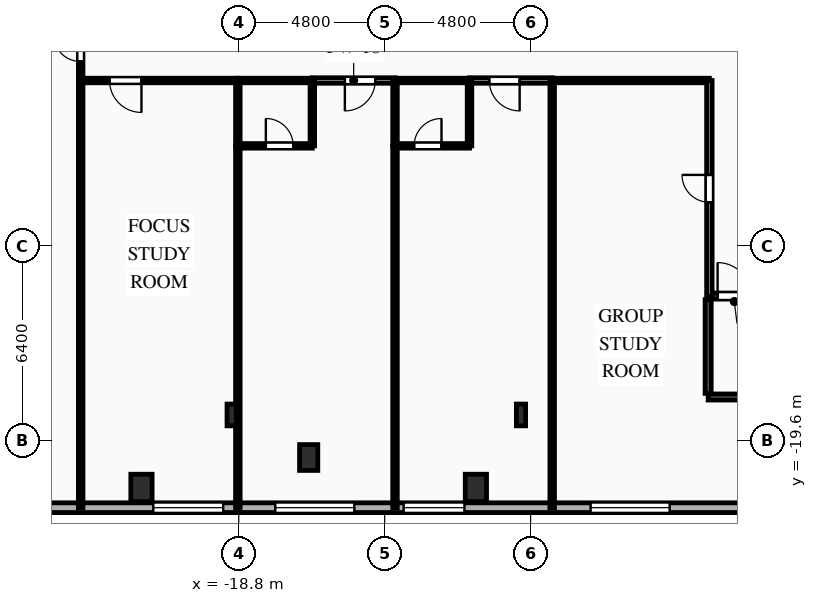
"""IFC4 building model, lengths in metres.
Left out: names, types, materials, properties, quantities, classifications, styles, units other than length and angle.
Written with IfcOpenShell. Run it as: python <this file> out.ifc"""

import sys

from ifc_helpers import new_model, si_unit, direction, frame, frame_2d, origin, origin_2d, place, context, subcontext, project, spatial, rectangle, i_section, extrude, element, fill, save


model = new_model("IFC4")
c1 = context("Model", 3, precision=1e-05, world=origin(), true_north=direction((0.0, 1.0)))
c2 = subcontext(c1, "Body", "Model", "MODEL_VIEW")
j1 = project(units=[si_unit("LENGTHUNIT", "METRE"), si_unit("PLANEANGLEUNIT", "RADIAN")], contexts=[c1])
p1 = place(None, origin())
s1 = spatial("IfcSite", under=j1, at=p1, CompositionType="ELEMENT")
p2 = place(p1, origin())
s2 = spatial("IfcBuilding", under=s1, at=p2, CompositionType="ELEMENT")
p3 = place(p2, frame((0.0, 0.0, 18.0)))
s3 = spatial("IfcBuildingStorey", under=s2, at=p3, CompositionType="ELEMENT", Elevation=18.0)
for number, where, z_axis, x_axis in (
    (1, (-22.0, -21.15, 0.0), (0.0, 0.0, 1.0), (1.0, 0.0, 0.0)),
    (2, (-11.0, -21.15, 0.0), (0.0, 0.0, 1.0), (1.0, 0.0, 0.0)),
):
    element("IfcColumn", number, at=place(p3, frame(where, z_axis=z_axis, x_axis=x_axis)), inside=s3, PredefinedType="COLUMN", context=c2, shape_type="SweptSolid", body=[
        extrude(rectangle(XDim=0.7, YDim=0.9, at=origin_2d()), origin(), (0.0, 0.0, 1.0), 4.5),
    ])
p4 = place(p3, frame((-16.5, -20.15, 0.0), z_axis=(0.0, 0.0, 1.0), x_axis=(1.0, 0.0, 0.0)))
e3 = element("IfcColumn", 3, at=p4, inside=s3, PredefinedType="PILASTER", context=c2, shape_type="SweptSolid", body=[
    extrude(rectangle(XDim=0.6, YDim=0.85, at=origin_2d()), origin(), (0.0, 0.0, 1.0), 4.5),
])
for number, where, z_axis, x_axis in (
    (4, (-19.033, -18.75, 0.0), (0.0, 0.0, 1.0), (1.0, 0.0, 0.0)),
    (5, (-9.517, -18.75, 0.0), (0.0, 0.0, 1.0), (1.0, 0.0, 0.0)),
):
    element("IfcColumn", number, at=place(p3, frame(where, z_axis=z_axis, x_axis=x_axis)), inside=s3, PredefinedType="COLUMN", context=c2, shape_type="SweptSolid", body=[
        extrude(i_section(OverallWidth=0.304, OverallDepth=0.716, WebThickness=0.021, FlangeThickness=0.04, FilletRadius=0.027, at=origin_2d()), origin(), (0.0, 0.0, 1.0), 4.5),
    ])
p5 = place(p3, frame((36.8, -21.8, 0.0), z_axis=(0.0, 0.0, 1.0), x_axis=(-1.0, 0.0, 0.0)))
e6 = element("IfcWall", 6, at=p5, inside=s3, PredefinedType="SOLIDWALL", context=c2, shape_type="SweptSolid", body=[
    extrude(rectangle(XDim=73.6, YDim=0.32, at=frame_2d((36.8, 0.0))), origin(), (0.0, 0.0, 1.0), 4.17),
])
p6 = place(p5, frame((1.079, 0.0, 0.85)))
e7 = element("IfcOpeningElement", 7, at=p6, cuts=e6, PredefinedType="OPENING", context=c2, shape_type="SweptSolid", body=[
    extrude(rectangle(XDim=2.3, YDim=2.4, at=frame_2d((1.15, 1.2))), frame((0.0, 0.17, 0.0), z_axis=(0.0, -1.0, 0.0), x_axis=(1.0, 0.0, 0.0)), (0.0, 0.0, 1.0), 0.34),
])
p7 = place(p5, frame((8.431, 0.0, 0.85)))
e8 = element("IfcOpeningElement", 8, at=p7, cuts=e6, PredefinedType="OPENING", context=c2, shape_type="SweptSolid", body=[
    extrude(rectangle(XDim=2.6, YDim=2.4, at=frame_2d((1.3, 1.2))), frame((0.0, 0.17, 0.0), z_axis=(0.0, -1.0, 0.0), x_axis=(1.0, 0.0, 0.0)), (0.0, 0.0, 1.0), 0.34),
])
p8 = place(p5, frame((13.324, 0.0, 0.85)))
e9 = element("IfcOpeningElement", 9, at=p8, cuts=e6, PredefinedType="OPENING", context=c2, shape_type="SweptSolid", body=[
    extrude(rectangle(XDim=1.1, YDim=1.85, at=frame_2d((0.55, 0.925))), frame((0.0, 0.17, 0.0), z_axis=(0.0, -1.0, 0.0), x_axis=(1.0, 0.0, 0.0)), (0.0, 0.0, 1.0), 0.34),
])
p9 = place(p5, frame((16.619, 0.0, 0.85)))
e10 = element("IfcOpeningElement", 10, at=p9, cuts=e6, PredefinedType="OPENING", context=c2, shape_type="SweptSolid", body=[
    extrude(rectangle(XDim=2.0, YDim=2.4, at=frame_2d((1.0, 1.2))), frame((0.0, 0.17, 0.0), z_axis=(0.0, -1.0, 0.0), x_axis=(1.0, 0.0, 0.0)), (0.0, 0.0, 1.0), 0.34),
])
p10 = place(p5, frame((21.125, 0.0, 0.85)))
e11 = element("IfcOpeningElement", 11, at=p10, cuts=e6, PredefinedType="OPENING", context=c2, shape_type="SweptSolid", body=[
    extrude(rectangle(XDim=2.6, YDim=2.4, at=frame_2d((1.3, 1.2))), frame((0.0, 0.17, 0.0), z_axis=(0.0, -1.0, 0.0), x_axis=(1.0, 0.0, 0.0)), (0.0, 0.0, 1.0), 0.34),
])
p11 = place(p5, frame((27.531, 0.0, 0.85)))
e12 = element("IfcOpeningElement", 12, at=p11, cuts=e6, PredefinedType="OPENING", context=c2, shape_type="SweptSolid", body=[
    extrude(rectangle(XDim=2.6, YDim=2.4, at=frame_2d((1.3, 1.2))), frame((0.0, 0.17, 0.0), z_axis=(0.0, -1.0, 0.0), x_axis=(1.0, 0.0, 0.0)), (0.0, 0.0, 1.0), 0.34),
])
p12 = place(p5, frame((33.474, 0.0, 0.85)))
e13 = element("IfcOpeningElement", 13, at=p12, cuts=e6, PredefinedType="OPENING", context=c2, shape_type="SweptSolid", body=[
    extrude(rectangle(XDim=2.6, YDim=2.4, at=frame_2d((1.3, 1.2))), frame((0.0, 0.17, 0.0), z_axis=(0.0, -1.0, 0.0), x_axis=(1.0, 0.0, 0.0)), (0.0, 0.0, 1.0), 0.34),
])
p13 = place(p5, frame((41.427, 0.0, 0.85)))
e14 = element("IfcOpeningElement", 14, at=p13, cuts=e6, PredefinedType="OPENING", context=c2, shape_type="SweptSolid", body=[
    extrude(rectangle(XDim=2.6, YDim=2.4, at=frame_2d((1.3, 1.2))), frame((0.0, 0.17, 0.0), z_axis=(0.0, -1.0, 0.0), x_axis=(1.0, 0.0, 0.0)), (0.0, 0.0, 1.0), 0.34),
])
p14 = place(p5, frame((48.177, 0.0, 0.85)))
e15 = element("IfcOpeningElement", 15, at=p14, cuts=e6, PredefinedType="OPENING", context=c2, shape_type="SweptSolid", body=[
    extrude(rectangle(XDim=2.0, YDim=2.4, at=frame_2d((1.0, 1.2))), frame((0.0, 0.17, 0.0), z_axis=(0.0, -1.0, 0.0), x_axis=(1.0, 0.0, 0.0)), (0.0, 0.0, 1.0), 0.34),
])
p15 = place(p5, frame((51.798, 0.0, 0.85)))
e16 = element("IfcOpeningElement", 16, at=p15, cuts=e6, PredefinedType="OPENING", context=c2, shape_type="SweptSolid", body=[
    extrude(rectangle(XDim=2.6, YDim=2.4, at=frame_2d((1.3, 1.2))), frame((0.0, 0.17, 0.0), z_axis=(0.0, -1.0, 0.0), x_axis=(1.0, 0.0, 0.0)), (0.0, 0.0, 1.0), 0.34),
])
p16 = place(p5, frame((56.111, 0.0, 0.85)))
e17 = element("IfcOpeningElement", 17, at=p16, cuts=e6, PredefinedType="OPENING", context=c2, shape_type="SweptSolid", body=[
    extrude(rectangle(XDim=2.3, YDim=2.4, at=frame_2d((1.15, 1.2))), frame((0.0, 0.17, 0.0), z_axis=(0.0, -1.0, 0.0), x_axis=(1.0, 0.0, 0.0)), (0.0, 0.0, 1.0), 0.34),
])
p17 = place(p5, frame((62.649, 0.0, 0.85)))
e18 = element("IfcOpeningElement", 18, at=p17, cuts=e6, PredefinedType="OPENING", context=c2, shape_type="SweptSolid", body=[
    extrude(rectangle(XDim=2.6, YDim=2.4, at=frame_2d((1.3, 1.2))), frame((0.0, 0.17, 0.0), z_axis=(0.0, -1.0, 0.0), x_axis=(1.0, 0.0, 0.0)), (0.0, 0.0, 1.0), 0.34),
])
p18 = place(p5, frame((70.301, 0.0, 0.85)))
e19 = element("IfcOpeningElement", 19, at=p18, cuts=e6, PredefinedType="OPENING", context=c2, shape_type="SweptSolid", body=[
    extrude(rectangle(XDim=2.3, YDim=2.4, at=frame_2d((1.15, 1.2))), frame((0.0, 0.17, 0.0), z_axis=(0.0, -1.0, 0.0), x_axis=(1.0, 0.0, 0.0)), (0.0, 0.0, 1.0), 0.34),
])
p19 = place(p3, frame((-3.36, -14.84, 0.0), z_axis=(0.0, 0.0, 1.0), x_axis=(1.0, 0.0, 0.0)))
e20 = element("IfcWall", 20, at=p19, inside=s3, PredefinedType="SHEAR", context=c2, shape_type="SweptSolid", body=[
    extrude(rectangle(XDim=7.22, YDim=0.2, at=frame_2d((3.61, 0.0))), origin(), (0.0, 0.0, 1.0), 4.17),
])
p20 = place(p19, frame((0.31, 0.0, 0.0)))
e21 = element("IfcOpeningElement", 21, at=p20, cuts=e20, PredefinedType="OPENING", context=c2, shape_type="SweptSolid", body=[
    extrude(rectangle(XDim=1.1, YDim=2.15, at=frame_2d((0.55, 1.075))), frame((0.0, 0.11, 0.0), z_axis=(0.0, -1.0, 0.0), x_axis=(1.0, 0.0, 0.0)), (0.0, 0.0, 1.0), 0.22),
])
p21 = place(p3, frame((-3.36, -18.16, 0.0), z_axis=(0.0, 0.0, 1.0), x_axis=(1.0, 0.0, 0.0)))
e22 = element("IfcWall", 22, at=p21, inside=s3, PredefinedType="SHEAR", context=c2, shape_type="SweptSolid", body=[
    extrude(rectangle(XDim=7.22, YDim=0.2, at=frame_2d((3.61, 0.0))), origin(), (0.0, 0.0, 1.0), 4.17),
])
p22 = place(p3, frame((-3.36, -18.04, 0.0), z_axis=(0.0, 0.0, 1.0), x_axis=(0.0, 1.0, 0.0)))
e23 = element("IfcWall", 23, at=p22, inside=s3, PredefinedType="SHEAR", context=c2, shape_type="SweptSolid", body=[
    extrude(rectangle(XDim=3.08, YDim=0.2, at=frame_2d((1.54, 0.0))), origin(), (0.0, 0.0, 1.0), 4.17),
])
p23 = place(p3, frame((-24.0, -7.75, 0.0), z_axis=(0.0, 0.0, 1.0), x_axis=(0.0, 1.0, 0.0)))
e24 = element("IfcWall", 24, at=p23, inside=s3, PredefinedType="PARTITIONING", context=c2, shape_type="SweptSolid", body=[
    extrude(rectangle(XDim=2.15, YDim=0.15, at=frame_2d((1.075, 0.0))), origin(), (0.0, 0.0, 1.0), 4.17),
])
p24 = place(p23, frame((0.625, 0.0, 0.0)))
e25 = element("IfcOpeningElement", 25, at=p24, cuts=e24, PredefinedType="OPENING", context=c2, shape_type="SweptSolid", body=[
    extrude(rectangle(XDim=0.9, YDim=2.1, at=frame_2d((0.45, 1.05))), frame((0.0, 0.085, 0.0), z_axis=(0.0, -1.0, 0.0), x_axis=(1.0, 0.0, 0.0)), (0.0, 0.0, 1.0), 0.17),
])
p25 = place(p3, frame((-18.83, -7.75, 0.0), z_axis=(0.0, 0.0, 1.0), x_axis=(-1.0, 0.0, 0.0)))
e26 = element("IfcWall", 26, at=p25, inside=s3, PredefinedType="PARTITIONING", context=c2, shape_type="SweptSolid", body=[
    extrude(rectangle(XDim=5.17, YDim=0.15, at=frame_2d((2.585, 0.0))), origin(), (0.0, 0.0, 1.0), 4.17),
])
p26 = place(p25, frame((3.17, 0.0, 0.0)))
e27 = element("IfcOpeningElement", 27, at=p26, cuts=e26, PredefinedType="OPENING", context=c2, shape_type="SweptSolid", body=[
    extrude(rectangle(XDim=1.05, YDim=2.15, at=frame_2d((0.525, 1.075))), frame((0.0, 0.085, 0.0), z_axis=(0.0, -1.0, 0.0), x_axis=(1.0, 0.0, 0.0)), (0.0, 0.0, 1.0), 0.17),
])
p27 = place(p3, frame((-13.66, -7.75, 0.0), z_axis=(0.0, 0.0, 1.0), x_axis=(-1.0, 0.0, 0.0)))
e28 = element("IfcWall", 28, at=p27, inside=s3, PredefinedType="PARTITIONING", context=c2, shape_type="SweptSolid", body=[
    extrude(rectangle(XDim=2.72, YDim=0.18, at=frame_2d((1.36, 0.0))), origin(), (0.0, 0.0, 1.0), 4.17),
])
p28 = place(p27, frame((0.65, 0.0, 0.0)))
e29 = element("IfcOpeningElement", 29, at=p28, cuts=e28, PredefinedType="OPENING", context=c2, shape_type="SweptSolid", body=[
    extrude(rectangle(XDim=1.0, YDim=2.15, at=frame_2d((0.5, 1.075))), frame((0.0, 0.1, 0.0), z_axis=(0.0, -1.0, 0.0), x_axis=(1.0, 0.0, 0.0)), (0.0, 0.0, 1.0), 0.2),
])
p29 = place(p3, frame((-16.38, -7.75, 0.0), z_axis=(0.0, 0.0, 1.0), x_axis=(-1.0, 0.0, 0.0)))
e30 = element("IfcWall", 30, at=p29, inside=s3, PredefinedType="PLUMBINGWALL", context=c2, shape_type="SweptSolid", body=[
    extrude(rectangle(XDim=2.45, YDim=0.15, at=frame_2d((1.225, 0.0))), origin(), (0.0, 0.0, 1.0), 4.17),
])
p30 = place(p3, frame((-8.49, -7.75, 0.0), z_axis=(0.0, 0.0, 1.0), x_axis=(-1.0, 0.0, 0.0)))
e31 = element("IfcWall", 31, at=p30, inside=s3, PredefinedType="PARTITIONING", context=c2, shape_type="SweptSolid", body=[
    extrude(rectangle(XDim=2.72, YDim=0.18, at=frame_2d((1.36, 0.0))), origin(), (0.0, 0.0, 1.0), 4.17),
])
p31 = place(p30, frame((1.07, 0.0, 0.0)))
e32 = element("IfcOpeningElement", 32, at=p31, cuts=e31, PredefinedType="OPENING", context=c2, shape_type="SweptSolid", body=[
    extrude(rectangle(XDim=1.0, YDim=2.15, at=frame_2d((0.5, 1.075))), frame((0.0, 0.1, 0.0), z_axis=(0.0, -1.0, 0.0), x_axis=(1.0, 0.0, 0.0)), (0.0, 0.0, 1.0), 0.2),
])
p32 = place(p3, frame((-11.21, -7.75, 0.0), z_axis=(0.0, 0.0, 1.0), x_axis=(-1.0, 0.0, 0.0)))
e33 = element("IfcWall", 33, at=p32, inside=s3, PredefinedType="PLUMBINGWALL", context=c2, shape_type="SweptSolid", body=[
    extrude(rectangle(XDim=2.45, YDim=0.15, at=frame_2d((1.225, 0.0))), origin(), (0.0, 0.0, 1.0), 4.17),
])
p33 = place(p3, frame((-3.32, -7.75, 0.0), z_axis=(0.0, 0.0, 1.0), x_axis=(-1.0, 0.0, 0.0)))
e34 = element("IfcWall", 34, at=p33, inside=s3, PredefinedType="PARTITIONING", context=c2, shape_type="SweptSolid", body=[
    extrude(rectangle(XDim=5.17, YDim=0.15, at=frame_2d((2.585, 0.0))), origin(), (0.0, 0.0, 1.0), 4.17),
])
p34 = place(p3, frame((-3.32, -14.86, 0.0), z_axis=(0.0, 0.0, 1.0), x_axis=(0.0, 1.0, 0.0)))
e35 = element("IfcWall", 35, at=p34, inside=s3, PredefinedType="PARTITIONING", context=c2, shape_type="SweptSolid", body=[
    extrude(rectangle(XDim=7.11, YDim=0.18, at=frame_2d((3.555, 0.0))), origin(), (0.0, 0.0, 1.0), 4.17),
])
p35 = place(p34, frame((3.105, 0.0, 0.0)))
e36 = element("IfcOpeningElement", 36, at=p35, cuts=e35, PredefinedType="OPENING", context=c2, shape_type="SweptSolid", body=[
    extrude(rectangle(XDim=0.9, YDim=2.1, at=frame_2d((0.45, 1.05))), frame((0.0, 0.1, 0.0), z_axis=(0.0, -1.0, 0.0), x_axis=(1.0, 0.0, 0.0)), (0.0, 0.0, 1.0), 0.2),
])
p36 = place(p3, frame((-24.0, -7.75, 0.0), z_axis=(0.0, 0.0, 1.0), x_axis=(0.0, -1.0, 0.0)))
e37 = element("IfcWall", 37, at=p36, inside=s3, PredefinedType="PARTITIONING", context=c2, shape_type="SweptSolid", body=[
    extrude(rectangle(XDim=14.05, YDim=0.15, at=frame_2d((7.025, 0.0))), origin(), (0.0, 0.0, 1.0), 4.17),
])
p37 = place(p3, frame((-18.83, -9.9, 0.0), z_axis=(0.0, 0.0, 1.0), x_axis=(0.0, -1.0, 0.0)))
e38 = element("IfcWall", 38, at=p37, inside=s3, PredefinedType="PARTITIONING", context=c2, shape_type="SweptSolid", body=[
    extrude(rectangle(XDim=11.9, YDim=0.15, at=frame_2d((5.95, 0.0))), origin(), (0.0, 0.0, 1.0), 3.655),
])
p38 = place(p3, frame((-18.83, -7.75, 0.0), z_axis=(0.0, 0.0, 1.0), x_axis=(0.0, -1.0, 0.0)))
e39 = element("IfcWall", 39, at=p38, inside=s3, PredefinedType="PLUMBINGWALL", context=c2, shape_type="SweptSolid", body=[
    extrude(rectangle(XDim=2.15, YDim=0.15, at=frame_2d((1.075, 0.0))), origin(), (0.0, 0.0, 1.0), 3.655),
])
p39 = place(p3, frame((-18.83, -9.9, 0.0), z_axis=(0.0, 0.0, 1.0), x_axis=(1.0, 0.0, 0.0)))
e40 = element("IfcWall", 40, at=p39, inside=s3, PredefinedType="PLUMBINGWALL", context=c2, shape_type="SweptSolid", body=[
    extrude(rectangle(XDim=2.45, YDim=0.15, at=frame_2d((1.225, 0.0))), origin(), (0.0, 0.0, 1.0), 4.17),
])
p40 = place(p39, frame((0.921, 0.0, 0.0)))
e41 = element("IfcOpeningElement", 41, at=p40, cuts=e40, PredefinedType="OPENING", context=c2, shape_type="SweptSolid", body=[
    extrude(rectangle(XDim=0.9, YDim=2.1, at=frame_2d((0.45, 1.05))), frame((0.0, 0.085, 0.0), z_axis=(0.0, -1.0, 0.0), x_axis=(1.0, 0.0, 0.0)), (0.0, 0.0, 1.0), 0.17),
])
p41 = place(p3, frame((-16.38, -9.9, 0.0), z_axis=(0.0, 0.0, 1.0), x_axis=(0.0, 1.0, 0.0)))
e42 = element("IfcWall", 42, at=p41, inside=s3, PredefinedType="PLUMBINGWALL", context=c2, shape_type="SweptSolid", body=[
    extrude(rectangle(XDim=2.15, YDim=0.15, at=frame_2d((1.075, 0.0))), origin(), (0.0, 0.0, 1.0), 4.17),
])
p42 = place(p3, frame((-13.66, -9.9, 0.0), z_axis=(0.0, 0.0, 1.0), x_axis=(0.0, -1.0, 0.0)))
e43 = element("IfcWall", 43, at=p42, inside=s3, PredefinedType="PARTITIONING", context=c2, shape_type="SweptSolid", body=[
    extrude(rectangle(XDim=11.9, YDim=0.15, at=frame_2d((5.95, 0.0))), origin(), (0.0, 0.0, 1.0), 4.17),
])
p43 = place(p3, frame((-13.66, -7.75, 0.0), z_axis=(0.0, 0.0, 1.0), x_axis=(0.0, -1.0, 0.0)))
e44 = element("IfcWall", 44, at=p43, inside=s3, PredefinedType="PLUMBINGWALL", context=c2, shape_type="SweptSolid", body=[
    extrude(rectangle(XDim=2.15, YDim=0.15, at=frame_2d((1.075, 0.0))), origin(), (0.0, 0.0, 1.0), 4.17),
])
p44 = place(p3, frame((-13.66, -9.9, 0.0), z_axis=(0.0, 0.0, 1.0), x_axis=(1.0, 0.0, 0.0)))
e45 = element("IfcWall", 45, at=p44, inside=s3, PredefinedType="PLUMBINGWALL", context=c2, shape_type="SweptSolid", body=[
    extrude(rectangle(XDim=2.45, YDim=0.15, at=frame_2d((1.225, 0.0))), origin(), (0.0, 0.0, 1.0), 4.17),
])
p45 = place(p44, frame((0.629, 0.0, 0.0)))
e46 = element("IfcOpeningElement", 46, at=p45, cuts=e45, PredefinedType="OPENING", context=c2, shape_type="SweptSolid", body=[
    extrude(rectangle(XDim=0.9, YDim=2.1, at=frame_2d((0.45, 1.05))), frame((0.0, 0.085, 0.0), z_axis=(0.0, -1.0, 0.0), x_axis=(1.0, 0.0, 0.0)), (0.0, 0.0, 1.0), 0.17),
])
p46 = place(p3, frame((-11.21, -9.9, 0.0), z_axis=(0.0, 0.0, 1.0), x_axis=(0.0, 1.0, 0.0)))
e47 = element("IfcWall", 47, at=p46, inside=s3, PredefinedType="PLUMBINGWALL", context=c2, shape_type="SweptSolid", body=[
    extrude(rectangle(XDim=2.15, YDim=0.15, at=frame_2d((1.075, 0.0))), origin(), (0.0, 0.0, 1.0), 4.17),
])
p47 = place(p3, frame((-8.49, -7.75, 0.0), z_axis=(0.0, 0.0, 1.0), x_axis=(0.0, -1.0, 0.0)))
e48 = element("IfcWall", 48, at=p47, inside=s3, PredefinedType="PARTITIONING", context=c2, shape_type="SweptSolid", body=[
    extrude(rectangle(XDim=14.05, YDim=0.15, at=frame_2d((7.025, 0.0))), origin(), (0.0, 0.0, 1.0), 4.17),
])
p48 = place(p13, origin())
e49 = element("IfcWindow", 49, at=p48, inside=s3, PartitioningType="SINGLE_PANEL", PredefinedType="WINDOW", context=c2, shape_type="SweptSolid", body=[
    extrude(rectangle(XDim=2.6, YDim=2.4, at=frame_2d((1.3, 1.2))), frame((0.0, 0.03, 0.0), z_axis=(0.0, -1.0, 0.0), x_axis=(1.0, 0.0, 0.0)), (0.0, 0.0, 1.0), 0.06),
])
fill(e14, e49)
p49 = place(p14, origin())
e50 = element("IfcWindow", 50, at=p49, inside=s3, PartitioningType="SINGLE_PANEL", PredefinedType="WINDOW", context=c2, shape_type="SweptSolid", body=[
    extrude(rectangle(XDim=2.0, YDim=2.4, at=frame_2d((1.0, 1.2))), frame((0.0, 0.03, 0.0), z_axis=(0.0, -1.0, 0.0), x_axis=(1.0, 0.0, 0.0)), (0.0, 0.0, 1.0), 0.06),
])
fill(e15, e50)
p50 = place(p15, origin())
e51 = element("IfcWindow", 51, at=p50, inside=s3, PartitioningType="SINGLE_PANEL", PredefinedType="WINDOW", context=c2, shape_type="SweptSolid", body=[
    extrude(rectangle(XDim=2.6, YDim=2.4, at=frame_2d((1.3, 1.2))), frame((0.0, 0.03, 0.0), z_axis=(0.0, -1.0, 0.0), x_axis=(1.0, 0.0, 0.0)), (0.0, 0.0, 1.0), 0.06),
])
fill(e16, e51)
p51 = place(p16, origin())
e52 = element("IfcWindow", 52, at=p51, inside=s3, PartitioningType="SINGLE_PANEL", PredefinedType="WINDOW", context=c2, shape_type="SweptSolid", body=[
    extrude(rectangle(XDim=2.3, YDim=2.4, at=frame_2d((1.15, 1.2))), frame((0.0, 0.03, 0.0), z_axis=(0.0, -1.0, 0.0), x_axis=(1.0, 0.0, 0.0)), (0.0, 0.0, 1.0), 0.06),
])
fill(e17, e52)
p52 = place(p20, origin())
e53 = element("IfcDoor", 53, at=p52, inside=s3, OperationType="SINGLE_SWING_LEFT", PredefinedType="DOOR", context=c2, shape_type="SweptSolid", body=[
    extrude(rectangle(XDim=1.1, YDim=2.15, at=frame_2d((0.55, 1.075))), frame((0.0, 0.025, 0.0), z_axis=(0.0, -1.0, 0.0), x_axis=(1.0, 0.0, 0.0)), (0.0, 0.0, 1.0), 0.05),
])
fill(e21, e53)
p53 = place(p24, origin())
e54 = element("IfcDoor", 54, at=p53, inside=s3, OperationType="SINGLE_SWING_RIGHT", PredefinedType="DOOR", context=c2, shape_type="SweptSolid", body=[
    extrude(rectangle(XDim=0.9, YDim=2.1, at=frame_2d((0.45, 1.05))), frame((0.0, 0.025, 0.0), z_axis=(0.0, -1.0, 0.0), x_axis=(1.0, 0.0, 0.0)), (0.0, 0.0, 1.0), 0.05),
])
fill(e25, e54)
p54 = place(p26, origin())
e55 = element("IfcDoor", 55, at=p54, inside=s3, OperationType="SINGLE_SWING_LEFT", PredefinedType="DOOR", context=c2, shape_type="SweptSolid", body=[
    extrude(rectangle(XDim=1.05, YDim=2.15, at=frame_2d((0.525, 1.075))), frame((0.0, 0.025, 0.0), z_axis=(0.0, -1.0, 0.0), x_axis=(1.0, 0.0, 0.0)), (0.0, 0.0, 1.0), 0.05),
])
fill(e27, e55)
p55 = place(p28, origin())
e56 = element("IfcDoor", 56, at=p55, inside=s3, OperationType="SINGLE_SWING_RIGHT", PredefinedType="DOOR", context=c2, shape_type="SweptSolid", body=[
    extrude(rectangle(XDim=1.0, YDim=2.15, at=frame_2d((0.5, 1.075))), frame((0.0, 0.025, 0.0), z_axis=(0.0, -1.0, 0.0), x_axis=(1.0, 0.0, 0.0)), (0.0, 0.0, 1.0), 0.05),
])
fill(e29, e56)
p56 = place(p31, origin())
e57 = element("IfcDoor", 57, at=p56, inside=s3, OperationType="SINGLE_SWING_LEFT", PredefinedType="DOOR", context=c2, shape_type="SweptSolid", body=[
    extrude(rectangle(XDim=1.0, YDim=2.15, at=frame_2d((0.5, 1.075))), frame((0.0, 0.025, 0.0), z_axis=(0.0, -1.0, 0.0), x_axis=(1.0, 0.0, 0.0)), (0.0, 0.0, 1.0), 0.05),
])
fill(e32, e57)
p57 = place(p35, origin())
e58 = element("IfcDoor", 58, at=p57, inside=s3, OperationType="SINGLE_SWING_RIGHT", PredefinedType="DOOR", context=c2, shape_type="SweptSolid", body=[
    extrude(rectangle(XDim=0.9, YDim=2.1, at=frame_2d((0.45, 1.05))), frame((0.0, 0.025, 0.0), z_axis=(0.0, -1.0, 0.0), x_axis=(1.0, 0.0, 0.0)), (0.0, 0.0, 1.0), 0.05),
])
fill(e36, e58)
p58 = place(p40, origin())
e59 = element("IfcDoor", 59, at=p58, inside=s3, OperationType="SINGLE_SWING_LEFT", PredefinedType="DOOR", context=c2, shape_type="SweptSolid", body=[
    extrude(rectangle(XDim=0.9, YDim=2.1, at=frame_2d((0.45, 1.05))), frame((0.0, 0.025, 0.0), z_axis=(0.0, -1.0, 0.0), x_axis=(1.0, 0.0, 0.0)), (0.0, 0.0, 1.0), 0.05),
])
fill(e41, e59)
p59 = place(p45, origin())
e60 = element("IfcDoor", 60, at=p59, inside=s3, OperationType="SINGLE_SWING_RIGHT", PredefinedType="DOOR", context=c2, shape_type="SweptSolid", body=[
    extrude(rectangle(XDim=0.9, YDim=2.1, at=frame_2d((0.45, 1.05))), frame((0.0, 0.025, 0.0), z_axis=(0.0, -1.0, 0.0), x_axis=(1.0, 0.0, 0.0)), (0.0, 0.0, 1.0), 0.05),
])
fill(e46, e60)
save(model, sys.argv[1])
